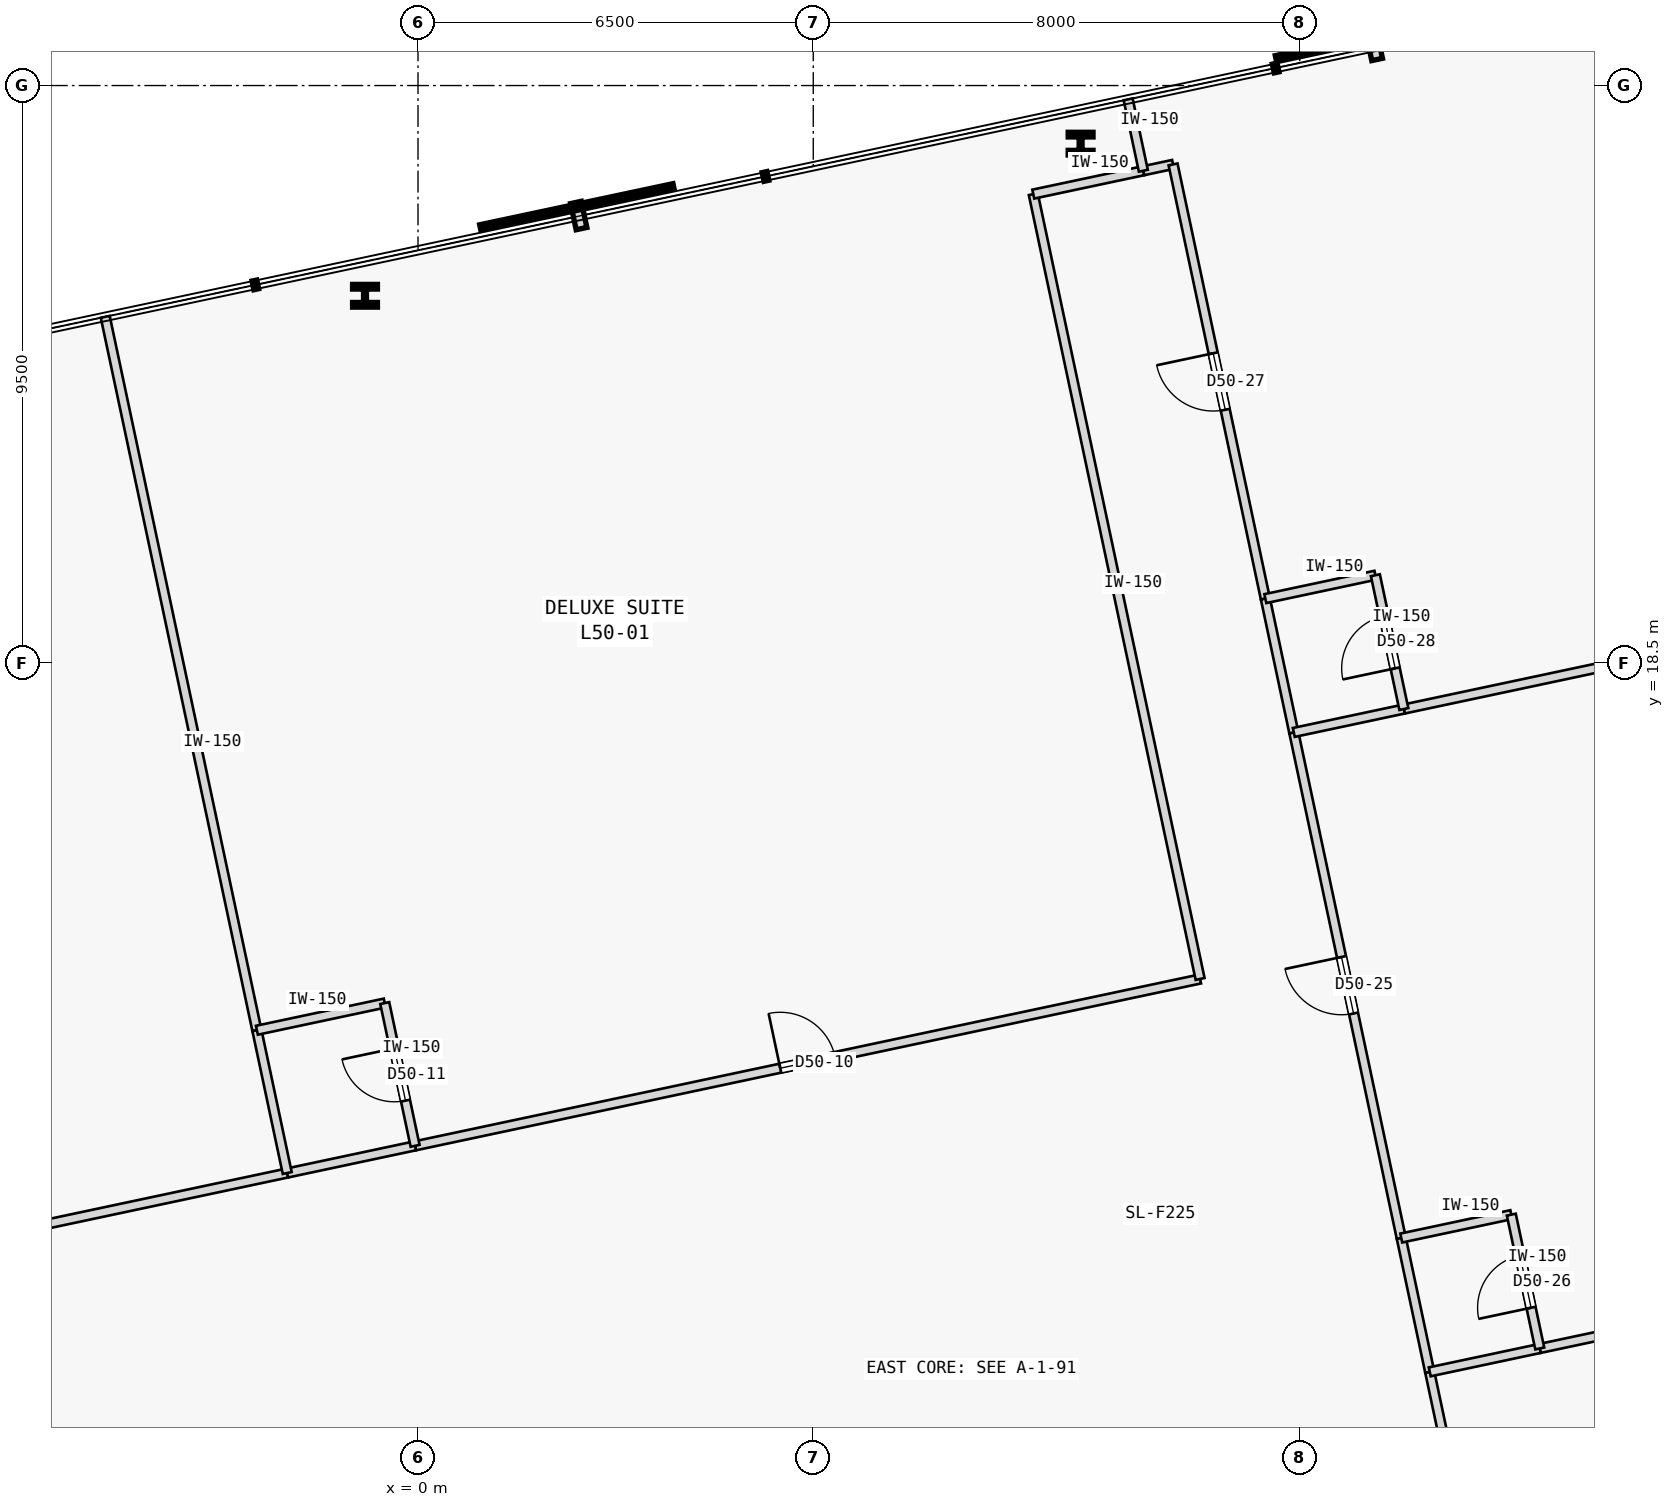
"""IFC4 building model, lengths in metres.
Left out: names, types, materials, properties, quantities, classifications, styles, units other than length and angle.
Written with IfcOpenShell. Run it as: python <this file> out.ifc"""

import sys

from ifc_helpers import new_model, si_unit, direction, frame, frame_2d, origin, origin_2d, place, context, subcontext, project, spatial, rectangle, i_section, extrude, element, fill, save


model = new_model("IFC4")
c1 = context("Model", 3, precision=1e-05, world=origin(), true_north=direction((0.0, 1.0)))
c2 = subcontext(c1, "Body", "Model", "MODEL_VIEW")
j1 = project(units=[si_unit("LENGTHUNIT", "METRE"), si_unit("PLANEANGLEUNIT", "RADIAN")], contexts=[c1])
p1 = place(None, origin())
s1 = spatial("IfcSite", under=j1, at=p1, CompositionType="ELEMENT")
p2 = place(p1, origin())
s2 = spatial("IfcBuilding", under=s1, at=p2, CompositionType="ELEMENT")
p3 = place(p2, frame((0.0, 0.0, 192.2)))
s3 = spatial("IfcBuildingStorey", under=s2, at=p3, CompositionType="ELEMENT", Elevation=192.2)
for number, where, z_axis, x_axis in (
    (1, (10.896, 27.044, 0.0), (0.0, 0.0, 1.0), (1.0, 0.0, 0.0)),
    (2, (-0.872, 24.543, 0.0), (0.0, 0.0, 1.0), (1.0, 0.0, 0.0)),
):
    element("IfcColumn", number, at=place(p3, frame(where, z_axis=z_axis, x_axis=x_axis)), inside=s3, PredefinedType="COLUMN", context=c2, shape_type="SweptSolid", body=[
        extrude(i_section(OverallWidth=0.409, OverallDepth=0.374, WebThickness=0.048, FlangeThickness=0.077, FilletRadius=0.015, at=origin_2d()), origin(), (0.0, 0.0, 1.0), 3.4),
    ])
p4 = place(p3, frame((-17.162, 6.926, 0.0), z_axis=(0.0, 0.0, 1.0), x_axis=(0.978145870853, 0.207919829103, 0.0)))
e3 = element("IfcWall", 3, at=p4, inside=s3, PredefinedType="PARTITIONING", context=c2, shape_type="SweptSolid", body=[
    extrude(rectangle(XDim=15.347, YDim=0.15, at=frame_2d((7.673, 0.0))), origin(), (0.0, 0.0, 1.0), 3.175),
])
p5 = place(p4, frame((7.213, 0.0, 0.0)))
e4 = element("IfcOpeningElement", 4, at=p5, cuts=e3, PredefinedType="OPENING", context=c2, shape_type="SweptSolid", body=[
    extrude(rectangle(XDim=0.92, YDim=2.15, at=frame_2d((0.46, 1.075))), frame((0.0, 0.085, 0.0), z_axis=(0.0, -1.0, 0.0), x_axis=(1.0, 0.0, 0.0)), (0.0, 0.0, 1.0), 0.17),
])
p6 = place(p3, frame((-0.048, 10.564, 0.0), z_axis=(0.0, 0.0, 1.0), x_axis=(0.978149729453, 0.207901675731, 0.0)))
e5 = element("IfcWall", 5, at=p6, inside=s3, PredefinedType="PARTITIONING", context=c2, shape_type="SweptSolid", body=[
    extrude(rectangle(XDim=13.198, YDim=0.15, at=frame_2d((6.599, 0.0))), origin(), (0.0, 0.0, 1.0), 3.175),
])
p7 = place(p6, frame((6.139, 0.0, 0.0)))
e6 = element("IfcOpeningElement", 6, at=p7, cuts=e5, PredefinedType="OPENING", context=c2, shape_type="SweptSolid", body=[
    extrude(rectangle(XDim=0.92, YDim=2.15, at=frame_2d((0.46, 1.075))), frame((0.0, 0.085, 0.0), z_axis=(0.0, -1.0, 0.0), x_axis=(1.0, 0.0, 0.0)), (0.0, 0.0, 1.0), 0.17),
])
p8 = place(p3, frame((12.862, 13.308, 0.0), z_axis=(0.0, 0.0, 1.0), x_axis=(-0.207911421929, 0.978147657888, 0.0)))
e7 = element("IfcWall", 7, at=p8, inside=s3, PredefinedType="PARTITIONING", context=c2, shape_type="SweptSolid", body=[
    extrude(rectangle(XDim=13.195, YDim=0.15, at=frame_2d((6.598, 0.0))), origin(), (0.0, 0.0, 1.0), 3.175),
])
p9 = place(p3, frame((10.118, 26.214, 0.0), z_axis=(0.0, 0.0, 1.0), x_axis=(0.978133353907, 0.20797870558, 0.0)))
e8 = element("IfcWall", 8, at=p9, inside=s3, PredefinedType="PARTITIONING", context=c2, shape_type="SweptSolid", body=[
    extrude(rectangle(XDim=1.85, YDim=0.15, at=frame_2d((0.925, 0.0))), origin(), (0.0, 0.0, 1.0), 3.175),
])
p10 = place(p3, frame((-2.151, 10.117, 0.0), z_axis=(0.0, 0.0, 1.0), x_axis=(0.978146728319, 0.207915795165, 0.0)))
e9 = element("IfcWall", 9, at=p10, inside=s3, PredefinedType="PARTITIONING", context=c2, shape_type="SweptSolid", body=[
    extrude(rectangle(XDim=2.15, YDim=0.15, at=frame_2d((1.075, 0.0))), origin(), (0.0, 0.0, 1.0), 3.175),
])
p11 = place(p3, frame((18.405, -1.468, 0.0), z_axis=(0.0, 0.0, 1.0), x_axis=(-0.207888984761, 0.97815242678, 0.0)))
e10 = element("IfcWall", 10, at=p11, inside=s3, PredefinedType="PARTITIONING", context=c2, shape_type="SweptSolid", body=[
    extrude(rectangle(XDim=8.5, YDim=0.15, at=frame_2d((4.25, 0.0))), origin(), (0.0, 0.0, 1.0), 3.175),
])
p12 = place(p11, frame((3.775, 0.0, 0.0)))
e11 = element("IfcOpeningElement", 11, at=p12, cuts=e10, PredefinedType="OPENING", context=c2, shape_type="SweptSolid", body=[
    extrude(rectangle(XDim=0.95, YDim=2.15, at=frame_2d((0.475, 1.075))), frame((0.0, 0.085, 0.0), z_axis=(0.0, -1.0, 0.0), x_axis=(1.0, 0.0, 0.0)), (0.0, 0.0, 1.0), 0.17),
])
p13 = place(p3, frame((16.17, 9.047, 0.0), z_axis=(0.0, 0.0, 1.0), x_axis=(-0.2079164651, 0.978146585917, 0.0)))
e12 = element("IfcWall", 12, at=p13, inside=s3, PredefinedType="PARTITIONING", context=c2, shape_type="SweptSolid", body=[
    extrude(rectangle(XDim=8.5, YDim=0.15, at=frame_2d((4.25, 0.0))), origin(), (0.0, 0.0, 1.0), 3.175),
])
p14 = place(p13, frame((3.775, 0.0, 0.0)))
e13 = element("IfcOpeningElement", 13, at=p14, cuts=e12, PredefinedType="OPENING", context=c2, shape_type="SweptSolid", body=[
    extrude(rectangle(XDim=0.95, YDim=2.15, at=frame_2d((0.475, 1.075))), frame((0.0, 0.085, 0.0), z_axis=(0.0, -1.0, 0.0), x_axis=(1.0, 0.0, 0.0)), (0.0, 0.0, 1.0), 0.17),
])
p15 = place(p3, frame((16.638, 6.847, 0.0), z_axis=(0.0, 0.0, 1.0), x_axis=(-0.207913264065, 0.978147266328, 0.0)))
e14 = element("IfcWall", 14, at=p15, inside=s3, PredefinedType="PARTITIONING", context=c2, shape_type="SweptSolid", body=[
    extrude(rectangle(XDim=2.25, YDim=0.15, at=frame_2d((1.125, 0.0))), origin(), (0.0, 0.0, 1.0), 3.175),
])
p16 = place(p3, frame((11.928, 26.599, 0.0), z_axis=(0.0, 0.0, 1.0), x_axis=(0.97822210712, 0.207560856478, 0.0)))
e15 = element("IfcWall", 15, at=p16, inside=s3, PredefinedType="PARTITIONING", context=c2, shape_type="SweptSolid", body=[
    extrude(rectangle(XDim=0.5, YDim=0.15, at=frame_2d((0.25, 0.0))), origin(), (0.0, 0.0, 1.0), 3.175),
])
p17 = place(p3, frame((13.935, 19.562, 0.0), z_axis=(0.0, 0.0, 1.0), x_axis=(-0.207923154003, 0.978145164088, 0.0)))
e16 = element("IfcWall", 16, at=p17, inside=s3, PredefinedType="PARTITIONING", context=c2, shape_type="SweptSolid", body=[
    extrude(rectangle(XDim=7.3, YDim=0.15, at=frame_2d((3.65, 0.0))), origin(), (0.0, 0.0, 1.0), 3.175),
])
p18 = place(p17, frame((3.175, 0.0, 0.0)))
e17 = element("IfcOpeningElement", 17, at=p18, cuts=e16, PredefinedType="OPENING", context=c2, shape_type="SweptSolid", body=[
    extrude(rectangle(XDim=0.95, YDim=2.15, at=frame_2d((0.475, 1.075))), frame((0.0, 0.085, 0.0), z_axis=(0.0, -1.0, 0.0), x_axis=(1.0, 0.0, 0.0)), (0.0, 0.0, 1.0), 0.17),
])
p19 = place(p3, frame((14.403, 17.362, 0.0), z_axis=(0.0, 0.0, 1.0), x_axis=(-0.207913264065, 0.978147266328, 0.0)))
e18 = element("IfcWall", 18, at=p19, inside=s3, PredefinedType="PARTITIONING", context=c2, shape_type="SweptSolid", body=[
    extrude(rectangle(XDim=2.25, YDim=0.15, at=frame_2d((1.125, 0.0))), origin(), (0.0, 0.0, 1.0), 3.175),
])
p20 = place(p3, frame((-2.65, 12.464, 0.0), z_axis=(0.0, 0.0, 1.0), x_axis=(-0.207914988081, 0.978146899873, 0.0)))
e19 = element("IfcWall", 19, at=p20, inside=s3, PredefinedType="PARTITIONING", context=c2, shape_type="SweptSolid", body=[
    extrude(rectangle(XDim=11.995, YDim=0.15, at=frame_2d((5.998, 0.0))), origin(), (0.0, 0.0, 1.0), 3.175),
])
p21 = place(p3, frame((-2.151, 10.117, 0.0), z_axis=(0.0, 0.0, 1.0), x_axis=(-0.207917150959, 0.978146440129, 0.0)))
e20 = element("IfcWall", 20, at=p21, inside=s3, PredefinedType="PARTITIONING", context=c2, shape_type="SweptSolid", body=[
    extrude(rectangle(XDim=2.4, YDim=0.15, at=frame_2d((1.2, 0.0))), origin(), (0.0, 0.0, 1.0), 3.175),
])
p22 = place(p3, frame((-2.65, 12.464, 0.0), z_axis=(0.0, 0.0, 1.0), x_axis=(0.978146728319, 0.207915795165, 0.0)))
e21 = element("IfcWall", 21, at=p22, inside=s3, PredefinedType="PARTITIONING", context=c2, shape_type="SweptSolid", body=[
    extrude(rectangle(XDim=2.15, YDim=0.15, at=frame_2d((1.075, 0.0))), origin(), (0.0, 0.0, 1.0), 3.175),
])
p23 = place(p3, frame((-0.048, 10.564, 0.0), z_axis=(0.0, 0.0, 1.0), x_axis=(-0.207917150959, 0.978146440129, 0.0)))
e22 = element("IfcWall", 22, at=p23, inside=s3, PredefinedType="PARTITIONING", context=c2, shape_type="SweptSolid", body=[
    extrude(rectangle(XDim=2.4, YDim=0.15, at=frame_2d((1.2, 0.0))), origin(), (0.0, 0.0, 1.0), 3.175),
])
p24 = place(p23, frame((0.76, 0.0, 0.0)))
e23 = element("IfcOpeningElement", 23, at=p24, cuts=e22, PredefinedType="OPENING", context=c2, shape_type="SweptSolid", body=[
    extrude(rectangle(XDim=0.88, YDim=2.15, at=frame_2d((0.44, 1.075))), frame((0.0, 0.085, 0.0), z_axis=(0.0, -1.0, 0.0), x_axis=(1.0, 0.0, 0.0)), (0.0, 0.0, 1.0), 0.17),
])
p25 = place(p3, frame((11.928, 26.599, 0.0), z_axis=(0.0, 0.0, 1.0), x_axis=(-0.20795853359, 0.978137642823, 0.0)))
e24 = element("IfcWall", 24, at=p25, inside=s3, PredefinedType="PARTITIONING", context=c2, shape_type="SweptSolid", body=[
    extrude(rectangle(XDim=1.2, YDim=0.15, at=frame_2d((0.6, 0.0))), origin(), (0.0, 0.0, 1.0), 3.175),
])
p26 = place(p3, frame((18.447, 7.231, 0.0), z_axis=(0.0, 0.0, 1.0), x_axis=(0.978149634612, 0.207902121941, 0.0)))
e25 = element("IfcWall", 25, at=p26, inside=s3, PredefinedType="PARTITIONING", context=c2, shape_type="SweptSolid", body=[
    extrude(rectangle(XDim=12.187, YDim=0.15, at=frame_2d((6.094, 0.0))), origin(), (0.0, 0.0, 1.0), 3.175),
])
p27 = place(p3, frame((16.638, 6.847, 0.0), z_axis=(0.0, 0.0, 1.0), x_axis=(0.978160192495, 0.207852442415, 0.0)))
e26 = element("IfcWall", 26, at=p27, inside=s3, PredefinedType="PARTITIONING", context=c2, shape_type="SweptSolid", body=[
    extrude(rectangle(XDim=1.85, YDim=0.15, at=frame_2d((0.925, 0.0))), origin(), (0.0, 0.0, 1.0), 3.175),
])
p28 = place(p3, frame((16.17, 9.047, 0.0), z_axis=(0.0, 0.0, 1.0), x_axis=(0.978133353907, 0.20797870558, 0.0)))
e27 = element("IfcWall", 27, at=p28, inside=s3, PredefinedType="PARTITIONING", context=c2, shape_type="SweptSolid", body=[
    extrude(rectangle(XDim=1.85, YDim=0.15, at=frame_2d((0.925, 0.0))), origin(), (0.0, 0.0, 1.0), 3.175),
])
p29 = place(p3, frame((18.447, 7.231, 0.0), z_axis=(0.0, 0.0, 1.0), x_axis=(-0.207891197838, 0.978151956427, 0.0)))
e28 = element("IfcWall", 28, at=p29, inside=s3, PredefinedType="PARTITIONING", context=c2, shape_type="SweptSolid", body=[
    extrude(rectangle(XDim=2.25, YDim=0.15, at=frame_2d((1.125, 0.0))), origin(), (0.0, 0.0, 1.0), 3.175),
])
p30 = place(p29, frame((0.685, 0.0, 0.0)))
e29 = element("IfcOpeningElement", 29, at=p30, cuts=e28, PredefinedType="OPENING", context=c2, shape_type="SweptSolid", body=[
    extrude(rectangle(XDim=0.88, YDim=2.15, at=frame_2d((0.44, 1.075))), frame((0.0, 0.085, 0.0), z_axis=(0.0, -1.0, 0.0), x_axis=(1.0, 0.0, 0.0)), (0.0, 0.0, 1.0), 0.17),
])
p31 = place(p3, frame((16.212, 17.746, 0.0), z_axis=(0.0, 0.0, 1.0), x_axis=(0.978149634612, 0.207902121941, 0.0)))
e30 = element("IfcWall", 30, at=p31, inside=s3, PredefinedType="PARTITIONING", context=c2, shape_type="SweptSolid", body=[
    extrude(rectangle(XDim=12.187, YDim=0.15, at=frame_2d((6.094, 0.0))), origin(), (0.0, 0.0, 1.0), 3.175),
])
for number, where, z_axis, x_axis in (
    (31, (14.403, 17.362, 0.0), (0.0, 0.0, 1.0), (0.978, 0.208, 0.0)),
    (32, (13.935, 19.562, 0.0), (0.0, 0.0, 1.0), (0.978, 0.208, 0.0)),
):
    element("IfcWall", number, at=place(p3, frame(where, z_axis=z_axis, x_axis=x_axis)), inside=s3, PredefinedType="PARTITIONING", context=c2, shape_type="SweptSolid", body=[
        extrude(rectangle(XDim=1.85, YDim=0.15, at=frame_2d((0.925, 0.0))), origin(), (0.0, 0.0, 1.0), 3.175),
    ])
p32 = place(p3, frame((16.212, 17.746, 0.0), z_axis=(0.0, 0.0, 1.0), x_axis=(-0.207913264065, 0.978147266328, 0.0)))
e33 = element("IfcWall", 33, at=p32, inside=s3, PredefinedType="PARTITIONING", context=c2, shape_type="SweptSolid", body=[
    extrude(rectangle(XDim=2.25, YDim=0.15, at=frame_2d((1.125, 0.0))), origin(), (0.0, 0.0, 1.0), 3.175),
])
p33 = place(p32, frame((0.685, 0.0, 0.0)))
e34 = element("IfcOpeningElement", 34, at=p33, cuts=e33, PredefinedType="OPENING", context=c2, shape_type="SweptSolid", body=[
    extrude(rectangle(XDim=0.88, YDim=2.15, at=frame_2d((0.44, 1.075))), frame((0.0, 0.085, 0.0), z_axis=(0.0, -1.0, 0.0), x_axis=(1.0, 0.0, 0.0)), (0.0, 0.0, 1.0), 0.17),
])
p34 = place(p7, origin())
e35 = element("IfcDoor", 35, at=p34, inside=s3, OperationType="SINGLE_SWING_LEFT", PredefinedType="DOOR", context=c2, shape_type="SweptSolid", body=[
    extrude(rectangle(XDim=0.92, YDim=2.15, at=frame_2d((0.46, 1.075))), frame((0.0, 0.025, 0.0), z_axis=(0.0, -1.0, 0.0), x_axis=(1.0, 0.0, 0.0)), (0.0, 0.0, 1.0), 0.05),
])
fill(e6, e35)
p35 = place(p24, origin())
e36 = element("IfcDoor", 36, at=p35, inside=s3, OperationType="SINGLE_SWING_RIGHT", PredefinedType="DOOR", context=c2, shape_type="SweptSolid", body=[
    extrude(rectangle(XDim=0.88, YDim=2.15, at=frame_2d((0.44, 1.075))), frame((0.0, 0.025, 0.0), z_axis=(0.0, -1.0, 0.0), x_axis=(1.0, 0.0, 0.0)), (0.0, 0.0, 1.0), 0.05),
])
fill(e23, e36)
p36 = place(p14, origin())
e37 = element("IfcDoor", 37, at=p36, inside=s3, OperationType="SINGLE_SWING_RIGHT", PredefinedType="DOOR", context=c2, shape_type="SweptSolid", body=[
    extrude(rectangle(XDim=0.95, YDim=2.15, at=frame_2d((0.475, 1.075))), frame((0.0, 0.025, 0.0), z_axis=(0.0, -1.0, 0.0), x_axis=(1.0, 0.0, 0.0)), (0.0, 0.0, 1.0), 0.05),
])
fill(e13, e37)
p37 = place(p30, origin())
e38 = element("IfcDoor", 38, at=p37, inside=s3, OperationType="SINGLE_SWING_LEFT", PredefinedType="DOOR", context=c2, shape_type="SweptSolid", body=[
    extrude(rectangle(XDim=0.88, YDim=2.15, at=frame_2d((0.44, 1.075))), frame((0.0, 0.025, 0.0), z_axis=(0.0, -1.0, 0.0), x_axis=(1.0, 0.0, 0.0)), (0.0, 0.0, 1.0), 0.05),
])
fill(e29, e38)
p38 = place(p18, origin())
e39 = element("IfcDoor", 39, at=p38, inside=s3, OperationType="SINGLE_SWING_RIGHT", PredefinedType="DOOR", context=c2, shape_type="SweptSolid", body=[
    extrude(rectangle(XDim=0.95, YDim=2.15, at=frame_2d((0.475, 1.075))), frame((0.0, 0.025, 0.0), z_axis=(0.0, -1.0, 0.0), x_axis=(1.0, 0.0, 0.0)), (0.0, 0.0, 1.0), 0.05),
])
fill(e17, e39)
p39 = place(p33, origin())
e40 = element("IfcDoor", 40, at=p39, inside=s3, OperationType="SINGLE_SWING_LEFT", PredefinedType="DOOR", context=c2, shape_type="SweptSolid", body=[
    extrude(rectangle(XDim=0.88, YDim=2.15, at=frame_2d((0.44, 1.075))), frame((0.0, 0.025, 0.0), z_axis=(0.0, -1.0, 0.0), x_axis=(1.0, 0.0, 0.0)), (0.0, 0.0, 1.0), 0.05),
])
fill(e34, e40)
save(model, sys.argv[1])
